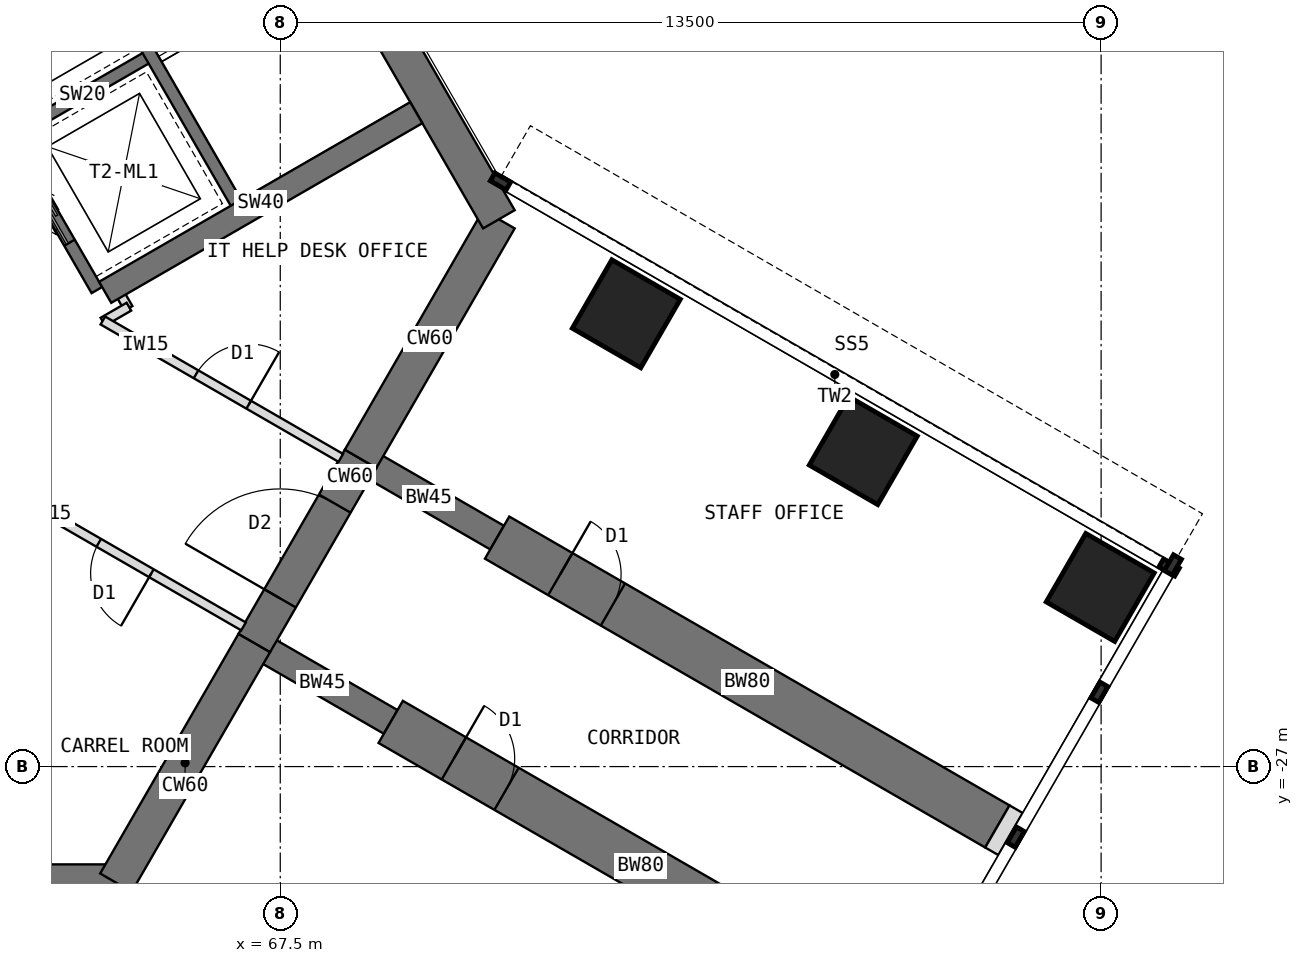
"""IFC4 building model, lengths in metres.
Left out: names, types, materials, properties, quantities, classifications, styles, units other than length and angle.
Written with IfcOpenShell. Run it as: python <this file> out.ifc"""

import sys

from ifc_helpers import new_model, si_unit, direction, frame, frame_2d, origin, origin_2d, place, context, subcontext, project, spatial, rectangle, extrude, element, fill, save


model = new_model("IFC4")
c1 = context("Model", 3, precision=1e-05, world=origin(), true_north=direction((0.0, 1.0)))
c2 = subcontext(c1, "Body", "Model", "MODEL_VIEW")
j1 = project(units=[si_unit("LENGTHUNIT", "METRE"), si_unit("PLANEANGLEUNIT", "RADIAN")], contexts=[c1])
p1 = place(None, origin())
s1 = spatial("IfcSite", under=j1, at=p1, CompositionType="ELEMENT")
p2 = place(p1, origin())
s2 = spatial("IfcBuilding", under=s1, at=p2, CompositionType="ELEMENT")
p3 = place(p2, frame((0.0, 0.0, 121.5)))
s3 = spatial("IfcBuildingStorey", under=s2, at=p3, CompositionType="ELEMENT", Elevation=121.5)
p4 = place(p3, frame((52.202, -28.908, 0.0), z_axis=(0.0, 0.0, 1.0), x_axis=(1.0, 0.0, 0.0)))
e1 = element("IfcWall", 1, at=p4, inside=s3, PredefinedType="SHEAR", context=c2, shape_type="SweptSolid", body=[
    extrude(rectangle(XDim=12.596, YDim=0.6, at=frame_2d((6.298, 0.0))), origin(), (0.0, 0.0, 1.0), 4.0),
])
p5 = place(p3, frame((64.798, -28.908, 0.0), z_axis=(0.0, 0.0, 1.0), x_axis=(0.499984222037, 0.866034513004, 0.0)))
e2 = element("IfcWall", 2, at=p5, inside=s3, PredefinedType="SHEAR", context=c2, shape_type="SweptSolid", body=[
    extrude(rectangle(XDim=4.548, YDim=0.6, at=frame_2d((2.274, 0.0))), origin(), (0.0, 0.0, 1.0), 4.0),
])
p6 = place(p3, frame((67.072, -24.97, 0.0), z_axis=(0.0, 0.0, 1.0), x_axis=(0.500010275428, 0.866019471182, 0.0)))
e3 = element("IfcWall", 3, at=p6, inside=s3, PredefinedType="SHEAR", context=c2, shape_type="SweptSolid", body=[
    extrude(rectangle(XDim=3.5, YDim=0.6, at=frame_2d((1.75, 0.0))), origin(), (0.0, 0.0, 1.0), 4.0),
])
p7 = place(p6, frame((0.85, 0.0, 0.0)))
e4 = element("IfcOpeningElement", 4, at=p7, cuts=e3, PredefinedType="OPENING", context=c2, shape_type="SweptSolid", body=[
    extrude(rectangle(XDim=1.8, YDim=2.1, at=frame_2d((0.9, 1.05))), frame((0.0, 0.31, 0.0), z_axis=(0.0, -1.0, 0.0), x_axis=(1.0, 0.0, 0.0)), (0.0, 0.0, 1.0), 0.62),
])
p8 = place(p3, frame((68.822, -21.939, 0.0), z_axis=(0.0, 0.0, 1.0), x_axis=(0.500024481964, 0.866011268655, 0.0)))
e5 = element("IfcWall", 5, at=p8, inside=s3, PredefinedType="SHEAR", context=c2, shape_type="SweptSolid", body=[
    extrude(rectangle(XDim=4.548, YDim=0.6, at=frame_2d((2.274, 0.0))), origin(), (0.0, 0.0, 1.0), 4.0),
])
p9 = place(p3, frame((71.096, -18.0, 0.0), z_axis=(0.0, 0.0, 1.0), x_axis=(-0.500005998175, 0.866021940709, 0.0)))
e6 = element("IfcWall", 6, at=p9, inside=s3, PredefinedType="SHEAR", context=c2, shape_type="SweptSolid", body=[
    extrude(rectangle(XDim=12.596, YDim=0.6, at=frame_2d((6.298, 0.0))), origin(), (0.0, 0.0, 1.0), 4.0),
])
p10 = place(p3, frame((68.822, -21.939, 0.0), z_axis=(0.0, 0.0, 1.0), x_axis=(0.866072649678, -0.499918158782, 0.0)))
e7 = element("IfcWall", 7, at=p10, inside=s3, PredefinedType="SHEAR", context=c2, shape_type="SweptSolid", body=[
    extrude(rectangle(XDim=2.592, YDim=0.45, at=frame_2d((1.296, 0.0))), origin(), (0.0, 0.0, 1.0), 4.0),
])
p11 = place(p3, frame((71.066, -23.234, 0.0), z_axis=(0.0, 0.0, 1.0), x_axis=(0.86602681393, -0.499997557548, 0.0)))
e8 = element("IfcWall", 8, at=p11, inside=s3, PredefinedType="SHEAR", context=c2, shape_type="SweptSolid", body=[
    extrude(rectangle(XDim=9.5, YDim=0.8, at=frame_2d((4.75, 0.0))), origin(), (0.0, 0.0, 1.0), 4.0),
])
p12 = place(p11, frame((1.2, 0.0, 0.0)))
e9 = element("IfcOpeningElement", 9, at=p12, cuts=e8, PredefinedType="OPENING", context=c2, shape_type="SweptSolid", body=[
    extrude(rectangle(XDim=1.0, YDim=2.1, at=frame_2d((0.5, 1.05))), frame((0.0, 0.41, 0.0), z_axis=(0.0, -1.0, 0.0), x_axis=(1.0, 0.0, 0.0)), (0.0, 0.0, 1.0), 0.82),
])
p13 = place(p3, frame((67.072, -24.97, 0.0), z_axis=(0.0, 0.0, 1.0), x_axis=(0.866031863473, -0.499988811324, 0.0)))
e10 = element("IfcWall", 10, at=p13, inside=s3, PredefinedType="SHEAR", context=c2, shape_type="SweptSolid", body=[
    extrude(rectangle(XDim=2.592, YDim=0.45, at=frame_2d((1.296, 0.0))), origin(), (0.0, 0.0, 1.0), 4.0),
])
p14 = place(p3, frame((69.316, -26.266, 0.0), z_axis=(0.0, 0.0, 1.0), x_axis=(0.86602681393, -0.499997557548, 0.0)))
e11 = element("IfcWall", 11, at=p14, inside=s3, PredefinedType="SHEAR", context=c2, shape_type="SweptSolid", body=[
    extrude(rectangle(XDim=9.5, YDim=0.8, at=frame_2d((4.75, 0.0))), origin(), (0.0, 0.0, 1.0), 4.0),
])
p15 = place(p14, frame((1.2, 0.0, 0.0)))
e12 = element("IfcOpeningElement", 12, at=p15, cuts=e11, PredefinedType="OPENING", context=c2, shape_type="SweptSolid", body=[
    extrude(rectangle(XDim=1.0, YDim=2.1, at=frame_2d((0.5, 1.05))), frame((0.0, 0.41, 0.0), z_axis=(0.0, -1.0, 0.0), x_axis=(1.0, 0.0, 0.0)), (0.0, 0.0, 1.0), 0.82),
])
for number, where, z_axis, x_axis in (
    (13, (73.191, -19.554, 0.0), (0.0, 0.0, 1.0), (0.5, 0.866, 0.0)),
    (14, (77.088, -21.804, 0.0), (0.0, 0.0, 1.0), (0.5, 0.866, 0.0)),
    (15, (80.986, -24.054, 0.0), (0.0, 0.0, 1.0), (0.5, 0.866, 0.0)),
):
    element("IfcColumn", number, at=place(p3, frame(where, z_axis=z_axis, x_axis=x_axis)), inside=s3, PredefinedType="COLUMN", context=c2, shape_type="SweptSolid", body=[
        extrude(rectangle(XDim=1.3, YDim=1.3, at=origin_2d()), origin(), (0.0, 0.0, 1.0), 4.0),
    ])
p16 = place(p3, frame((79.294, -27.984, 0.0), z_axis=(0.0, 0.0, 1.0), x_axis=(0.865827443207, -0.500342721131, 0.0)))
e16 = element("IfcWall", 16, at=p16, inside=s3, PredefinedType="PARTITIONING", context=c2, shape_type="SweptSolid", body=[
    extrude(rectangle(XDim=0.25, YDim=0.8, at=frame_2d((0.125, 0.0))), origin(), (0.0, 0.0, 1.0), 3.8),
])
p17 = place(p3, frame((64.484, -19.164, 0.0), z_axis=(0.0, 0.0, 1.0), x_axis=(-0.49999894854, 0.866026010844, 0.0)))
e17 = element("IfcWall", 17, at=p17, inside=s3, PredefinedType="SHEAR", context=c2, shape_type="SweptSolid", body=[
    extrude(rectangle(XDim=8.0, YDim=0.2, at=frame_2d((4.0, 0.0))), origin(), (0.0, 0.0, 1.0), 4.0),
])
p18 = place(p17, frame((6.3, 0.0, 0.0)))
e18 = element("IfcOpeningElement", 18, at=p18, cuts=e17, PredefinedType="OPENING", context=c2, shape_type="SweptSolid", body=[
    extrude(rectangle(XDim=1.2, YDim=2.1, at=frame_2d((0.6, 1.05))), frame((0.0, 0.11, 0.0), z_axis=(0.0, -1.0, 0.0), x_axis=(1.0, 0.0, 0.0)), (0.0, 0.0, 1.0), 0.22),
])
p19 = place(p17, frame((0.9, 0.0, 0.0)))
e19 = element("IfcOpeningElement", 19, at=p19, cuts=e17, PredefinedType="OPENING", context=c2, shape_type="SweptSolid", body=[
    extrude(rectangle(XDim=1.1, YDim=2.2, at=frame_2d((0.55, 1.1))), frame((0.0, 0.11, 0.0), z_axis=(0.0, -1.0, 0.0), x_axis=(1.0, 0.0, 0.0)), (0.0, 0.0, 1.0), 0.22),
])
p20 = place(p17, frame((3.8, 0.0, 0.0)))
e20 = element("IfcOpeningElement", 20, at=p20, cuts=e17, PredefinedType="OPENING", context=c2, shape_type="SweptSolid", body=[
    extrude(rectangle(XDim=1.1, YDim=2.2, at=frame_2d((0.55, 1.1))), frame((0.0, 0.11, 0.0), z_axis=(0.0, -1.0, 0.0), x_axis=(1.0, 0.0, 0.0)), (0.0, 0.0, 1.0), 0.22),
])
p21 = place(p3, frame((63.12, -16.603, 0.0), z_axis=(0.0, 0.0, 1.0), x_axis=(0.866062058628, 0.499936506574, 0.0)))
e21 = element("IfcWall", 21, at=p21, inside=s3, PredefinedType="SHEAR", context=c2, shape_type="SweptSolid", body=[
    extrude(rectangle(XDim=2.6, YDim=0.2, at=frame_2d((1.3, 0.0))), origin(), (0.0, 0.0, 1.0), 4.0),
])
p22 = place(p3, frame((66.822, -17.814, 0.0), z_axis=(0.0, 0.0, 1.0), x_axis=(-0.49999894854, 0.866026010844, 0.0)))
e22 = element("IfcWall", 22, at=p22, inside=s3, PredefinedType="SHEAR", context=c2, shape_type="SweptSolid", body=[
    extrude(rectangle(XDim=8.0, YDim=0.2, at=frame_2d((4.0, 0.0))), origin(), (0.0, 0.0, 1.0), 4.0),
])
p23 = place(p22, frame((6.7, 0.0, 0.0)))
e23 = element("IfcOpeningElement", 23, at=p23, cuts=e22, PredefinedType="OPENING", context=c2, shape_type="SweptSolid", body=[
    extrude(rectangle(XDim=1.1, YDim=2.1, at=frame_2d((0.55, 1.05))), frame((0.0, 0.11, 0.0), z_axis=(0.0, -1.0, 0.0), x_axis=(1.0, 0.0, 0.0)), (0.0, 0.0, 1.0), 0.22),
])
p24 = place(p3, frame((64.62, -19.201, 0.0), z_axis=(0.0, 0.0, 1.0), x_axis=(0.866027317282, 0.49999668571, 0.0)))
e24 = element("IfcWall", 24, at=p24, inside=s3, PredefinedType="SHEAR", context=c2, shape_type="SweptSolid", body=[
    extrude(rectangle(XDim=5.908, YDim=0.4, at=frame_2d((2.954, 0.0))), origin(), (0.0, 0.0, 1.0), 4.0),
])
p25 = place(p3, frame((64.789, -19.092, 0.0), z_axis=(0.0, 0.0, 1.0), x_axis=(0.499804398801, -0.866138304741, 0.0)))
e25 = element("IfcWall", 25, at=p25, inside=s3, PredefinedType="PARTITIONING", context=c2, shape_type="SweptSolid", body=[
    extrude(rectangle(XDim=0.43, YDim=0.15, at=frame_2d((0.215, 0.0))), origin(), (0.0, 0.0, 1.0), 3.8),
])
p26 = place(p3, frame((65.011, -19.437, 0.0), z_axis=(0.0, 0.0, 1.0), x_axis=(-0.865831790172, -0.50033519877, 0.0)))
e26 = element("IfcWall", 26, at=p26, inside=s3, PredefinedType="PARTITIONING", context=c2, shape_type="SweptSolid", body=[
    extrude(rectangle(XDim=0.494, YDim=0.15, at=frame_2d((0.247, 0.0))), origin(), (0.0, 0.0, 1.0), 3.8),
])
p27 = place(p3, frame((64.583, -19.664, 0.0), z_axis=(0.0, 0.0, 1.0), x_axis=(0.866006515865, -0.500032713409, 0.0)))
e27 = element("IfcWall", 27, at=p27, inside=s3, PredefinedType="PARTITIONING", context=c2, shape_type="SweptSolid", body=[
    extrude(rectangle(XDim=4.518, YDim=0.15, at=frame_2d((2.259, 0.0))), origin(), (0.0, 0.0, 1.0), 3.8),
])
p28 = place(p27, frame((1.769, 0.0, 0.0)))
e28 = element("IfcOpeningElement", 28, at=p28, cuts=e27, PredefinedType="OPENING", context=c2, shape_type="SweptSolid", body=[
    extrude(rectangle(XDim=1.0, YDim=2.1, at=frame_2d((0.5, 1.05))), frame((0.0, 0.085, 0.0), z_axis=(0.0, -1.0, 0.0), x_axis=(1.0, 0.0, 0.0)), (0.0, 0.0, 1.0), 0.17),
])
p29 = place(p3, frame((66.896, -24.695, 0.0), z_axis=(0.0, 0.0, 1.0), x_axis=(-0.86602002524, 0.500009315796, 0.0)))
e29 = element("IfcWall", 29, at=p29, inside=s3, PredefinedType="PARTITIONING", context=c2, shape_type="SweptSolid", body=[
    extrude(rectangle(XDim=4.519, YDim=0.15, at=frame_2d((2.259, 0.0))), origin(), (0.0, 0.0, 1.0), 3.8),
])
p30 = place(p29, frame((1.749, 0.0, 0.0)))
e30 = element("IfcOpeningElement", 30, at=p30, cuts=e29, PredefinedType="OPENING", context=c2, shape_type="SweptSolid", body=[
    extrude(rectangle(XDim=1.0, YDim=2.1, at=frame_2d((0.5, 1.05))), frame((0.0, 0.085, 0.0), z_axis=(0.0, -1.0, 0.0), x_axis=(1.0, 0.0, 0.0)), (0.0, 0.0, 1.0), 0.17),
])
p31 = place(p19, origin())
e31 = element("IfcDoor", 31, at=p31, inside=s3, OperationType="DOUBLE_DOOR_SLIDING", PredefinedType="DOOR", context=c2, shape_type="SweptSolid", body=[
    extrude(rectangle(XDim=1.1, YDim=2.2, at=frame_2d((0.55, 1.1))), frame((0.0, 0.025, 0.0), z_axis=(0.0, -1.0, 0.0), x_axis=(1.0, 0.0, 0.0)), (0.0, 0.0, 1.0), 0.05),
])
fill(e19, e31)
p32 = place(p7, origin())
e32 = element("IfcDoor", 32, at=p32, inside=s3, OperationType="DOUBLE_DOOR_DOUBLE_SWING", PredefinedType="DOOR", context=c2, shape_type="SweptSolid", body=[
    extrude(rectangle(XDim=1.72, YDim=2.06, at=frame_2d((0.9, 1.03))), frame((0.0, 0.025, 0.0), z_axis=(0.0, -1.0, 0.0), x_axis=(1.0, 0.0, 0.0)), (0.0, 0.0, 1.0), 0.05),
    extrude(rectangle(XDim=0.04, YDim=2.1, at=frame_2d((0.02, 1.05))), frame((0.0, 0.3, 0.0), z_axis=(0.0, -1.0, 0.0), x_axis=(1.0, 0.0, 0.0)), (0.0, 0.0, 1.0), 0.6),
    extrude(rectangle(XDim=0.04, YDim=2.1, at=frame_2d((1.78, 1.05))), frame((0.0, 0.3, 0.0), z_axis=(0.0, -1.0, 0.0), x_axis=(1.0, 0.0, 0.0)), (0.0, 0.0, 1.0), 0.6),
    extrude(rectangle(XDim=1.72, YDim=0.04, at=frame_2d((0.9, 2.08))), frame((0.0, 0.3, 0.0), z_axis=(0.0, -1.0, 0.0), x_axis=(1.0, 0.0, 0.0)), (0.0, 0.0, 1.0), 0.6),
])
fill(e4, e32)
p33 = place(p30, origin())
e33 = element("IfcDoor", 33, at=p33, inside=s3, OperationType="SINGLE_SWING_LEFT", PredefinedType="DOOR", context=c2, shape_type="SweptSolid", body=[
    extrude(rectangle(XDim=1.0, YDim=2.1, at=frame_2d((0.5, 1.05))), frame((0.0, 0.025, 0.0), z_axis=(0.0, -1.0, 0.0), x_axis=(1.0, 0.0, 0.0)), (0.0, 0.0, 1.0), 0.05),
])
fill(e30, e33)
p34 = place(p28, origin())
e34 = element("IfcDoor", 34, at=p34, inside=s3, OperationType="SINGLE_SWING_RIGHT", PredefinedType="DOOR", context=c2, shape_type="SweptSolid", body=[
    extrude(rectangle(XDim=1.0, YDim=2.1, at=frame_2d((0.5, 1.05))), frame((0.0, 0.025, 0.0), z_axis=(0.0, -1.0, 0.0), x_axis=(1.0, 0.0, 0.0)), (0.0, 0.0, 1.0), 0.05),
])
fill(e28, e34)
p35 = place(p12, origin())
e35 = element("IfcDoor", 35, at=p35, inside=s3, OperationType="SINGLE_SWING_LEFT", PredefinedType="DOOR", context=c2, shape_type="SweptSolid", body=[
    extrude(rectangle(XDim=0.92, YDim=2.06, at=frame_2d((0.5, 1.03))), frame((0.0, 0.025, 0.0), z_axis=(0.0, -1.0, 0.0), x_axis=(1.0, 0.0, 0.0)), (0.0, 0.0, 1.0), 0.05),
    extrude(rectangle(XDim=0.04, YDim=2.1, at=frame_2d((0.02, 1.05))), frame((0.0, 0.4, 0.0), z_axis=(0.0, -1.0, 0.0), x_axis=(1.0, 0.0, 0.0)), (0.0, 0.0, 1.0), 0.8),
    extrude(rectangle(XDim=0.04, YDim=2.1, at=frame_2d((0.98, 1.05))), frame((0.0, 0.4, 0.0), z_axis=(0.0, -1.0, 0.0), x_axis=(1.0, 0.0, 0.0)), (0.0, 0.0, 1.0), 0.8),
    extrude(rectangle(XDim=0.92, YDim=0.04, at=frame_2d((0.5, 2.08))), frame((0.0, 0.4, 0.0), z_axis=(0.0, -1.0, 0.0), x_axis=(1.0, 0.0, 0.0)), (0.0, 0.0, 1.0), 0.8),
])
fill(e9, e35)
p36 = place(p15, origin())
e36 = element("IfcDoor", 36, at=p36, inside=s3, OperationType="SINGLE_SWING_LEFT", PredefinedType="DOOR", context=c2, shape_type="SweptSolid", body=[
    extrude(rectangle(XDim=0.92, YDim=2.06, at=frame_2d((0.5, 1.03))), frame((0.0, 0.025, 0.0), z_axis=(0.0, -1.0, 0.0), x_axis=(1.0, 0.0, 0.0)), (0.0, 0.0, 1.0), 0.05),
    extrude(rectangle(XDim=0.04, YDim=2.1, at=frame_2d((0.02, 1.05))), frame((0.0, 0.4, 0.0), z_axis=(0.0, -1.0, 0.0), x_axis=(1.0, 0.0, 0.0)), (0.0, 0.0, 1.0), 0.8),
    extrude(rectangle(XDim=0.04, YDim=2.1, at=frame_2d((0.98, 1.05))), frame((0.0, 0.4, 0.0), z_axis=(0.0, -1.0, 0.0), x_axis=(1.0, 0.0, 0.0)), (0.0, 0.0, 1.0), 0.8),
    extrude(rectangle(XDim=0.92, YDim=0.04, at=frame_2d((0.5, 2.08))), frame((0.0, 0.4, 0.0), z_axis=(0.0, -1.0, 0.0), x_axis=(1.0, 0.0, 0.0)), (0.0, 0.0, 1.0), 0.8),
])
fill(e12, e36)
save(model, sys.argv[1])
